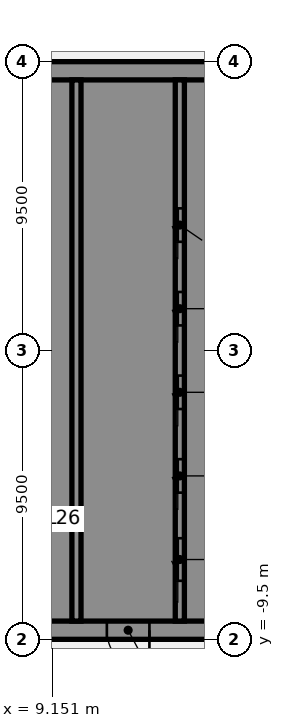
"""IFC4 building model, lengths in metres.
Left out: names, types, materials, properties, quantities, classifications, styles, units other than length and angle.
Written with IfcOpenShell. Run it as: python <this file> out.ifc"""

import sys

from ifc_helpers import new_model, si_unit, direction, frame, frame_2d, origin, place, context, subcontext, project, spatial, polyline, rectangle, outline, extrude, element, fill, save


model = new_model("IFC4")
c1 = context("Model", 3, precision=1e-05, world=origin(), true_north=direction((0.0, 1.0)))
c2 = subcontext(c1, "Body", "Model", "MODEL_VIEW")
j1 = project(units=[si_unit("LENGTHUNIT", "METRE"), si_unit("PLANEANGLEUNIT", "RADIAN")], contexts=[c1])
p1 = place(None, origin())
s1 = spatial("IfcSite", under=j1, at=p1, CompositionType="ELEMENT")
p2 = place(p1, origin())
s2 = spatial("IfcBuilding", under=s1, at=p2, CompositionType="ELEMENT")
p3 = place(p2, frame((0.0, 0.0, 109.75)))
s3 = spatial("IfcBuildingStorey", under=s2, at=p3, CompositionType="ELEMENT", Elevation=109.75)
p4 = place(p3, frame((16.5, -9.2, 0.0), z_axis=(0.0, 0.0, 1.0), x_axis=(-1.0, 0.0, 0.0)))
e1 = element("IfcWall", 1, at=p4, inside=s3, PredefinedType="SHEAR", context=c2, shape_type="SweptSolid", body=[
    extrude(rectangle(XDim=13.0, YDim=0.6, at=frame_2d((6.5, 0.0))), origin(), (0.0, 0.0, 1.0), 3.61),
])
p5 = place(p4, frame((4.15, 0.0, 0.0)))
e2 = element("IfcOpeningElement", 2, at=p5, cuts=e1, PredefinedType="OPENING", context=c2, shape_type="SweptSolid", body=[
    extrude(rectangle(XDim=1.4, YDim=2.1, at=frame_2d((0.7, 1.05))), frame((0.0, 0.31, 0.0), z_axis=(0.0, -1.0, 0.0), x_axis=(1.0, 0.0, 0.0)), (0.0, 0.0, 1.0), 0.62),
])
p6 = place(p4, frame((10.125, 0.0, 0.0)))
e3 = element("IfcOpeningElement", 3, at=p6, cuts=e1, PredefinedType="OPENING", context=c2, shape_type="SweptSolid", body=[
    extrude(rectangle(XDim=1.4, YDim=2.1, at=frame_2d((0.7, 1.05))), frame((0.0, 0.31, 0.0), z_axis=(0.0, -1.0, 0.0), x_axis=(1.0, 0.0, 0.0)), (0.0, 0.0, 1.0), 0.62),
])
p7 = place(p3, origin())
e4 = element("IfcWall", 4, at=p7, inside=s3, PredefinedType="SHEAR", context=c2, shape_type="SweptSolid", body=[
    extrude(outline(polyline([(13.5, -8.9), (15.9, -8.9), (16.5, -8.9), (16.5, 8.9), (15.9, 8.9), (13.5, 8.9), (13.5, 8.125), (15.9, 8.125), (15.9, 5.625), (13.5, 5.625), (13.5, 5.375), (15.9, 5.375), (15.9, 2.875), (13.5, 2.875), (13.5, 2.625), (15.9, 2.625), (15.9, 0.125), (13.5, 0.125), (13.5, -0.125), (15.9, -0.125), (15.9, -2.625), (13.5, -2.625), (13.5, -2.875), (15.9, -2.875), (15.9, -5.375), (13.5, -5.375), (13.5, -5.625), (15.9, -5.625), (15.9, -8.125), (13.5, -8.125), (13.5, -8.9)])), origin(), (0.0, 0.0, 1.0), 3.61),
])
p8 = place(p3, frame((16.5, 9.2, 0.0), z_axis=(0.0, 0.0, 1.0), x_axis=(-1.0, 0.0, 0.0)))
e5 = element("IfcWall", 5, at=p8, inside=s3, PredefinedType="SHEAR", context=c2, shape_type="SweptSolid", body=[
    extrude(rectangle(XDim=13.0, YDim=0.6, at=frame_2d((6.5, 0.0))), origin(), (0.0, 0.0, 1.0), 3.61),
])
p9 = place(p3, origin())
e6 = element("IfcWall", 6, at=p9, inside=s3, PredefinedType="SHEAR", context=c2, shape_type="SweptSolid", body=[
    extrude(outline(polyline([(9.8, -5.375), (7.5, -5.375), (7.5, -2.875), (9.8, -2.875), (9.8, -2.625), (7.5, -2.625), (7.5, -0.125), (9.8, -0.125), (9.8, 0.125), (7.5, 0.125), (7.5, 2.625), (9.8, 2.625), (9.8, 2.875), (7.5, 2.875), (7.5, 5.375), (9.8, 5.375), (9.8, 5.625), (7.5, 5.625), (7.5, 8.125), (9.8, 8.125), (9.8, 8.9), (7.5, 8.9), (7.2, 8.9), (7.2, -5.625), (7.5, -5.625), (9.8, -5.625), (9.8, -5.375)])), origin(), (0.0, 0.0, 1.0), 3.61),
])
p10 = place(p3, origin())
e7 = element("IfcWall", 7, at=p10, inside=s3, PredefinedType="SHEAR", context=c2, shape_type="SweptSolid", body=[
    extrude(outline(polyline([(7.5, -8.125), (7.5, -8.9), (9.8, -8.9), (9.8, -8.125), (9.8, -5.625), (9.55, -5.625), (9.55, -8.125), (7.5, -8.125)])), origin(), (0.0, 0.0, 1.0), 3.61),
])
p11 = place(p3, frame((13.35, -8.9, 0.0), z_axis=(0.0, 0.0, 1.0), x_axis=(0.0, 1.0, 0.0)))
e8 = element("IfcWall", 8, at=p11, inside=s3, PredefinedType="SHEAR", context=c2, shape_type="SweptSolid", body=[
    extrude(rectangle(XDim=17.8, YDim=0.3, at=frame_2d((8.9, 0.0))), origin(), (0.0, 0.0, 1.0), 3.61),
])
p12 = place(p11, frame((1.325, 0.0, 0.0)))
e9 = element("IfcOpeningElement", 9, at=p12, cuts=e8, PredefinedType="OPENING", context=c2, shape_type="SweptSolid", body=[
    extrude(rectangle(XDim=1.4, YDim=2.1, at=frame_2d((0.7, 1.05))), frame((0.0, 0.16, 0.0), z_axis=(0.0, -1.0, 0.0), x_axis=(1.0, 0.0, 0.0)), (0.0, 0.0, 1.0), 0.32),
])
p13 = place(p11, frame((4.225, 0.0, 0.0)))
e10 = element("IfcOpeningElement", 10, at=p13, cuts=e8, PredefinedType="OPENING", context=c2, shape_type="SweptSolid", body=[
    extrude(rectangle(XDim=1.1, YDim=2.1, at=frame_2d((0.55, 1.05))), frame((0.0, 0.16, 0.0), z_axis=(0.0, -1.0, 0.0), x_axis=(1.0, 0.0, 0.0)), (0.0, 0.0, 1.0), 0.32),
])
p14 = place(p11, frame((6.975, 0.0, 0.0)))
e11 = element("IfcOpeningElement", 11, at=p14, cuts=e8, PredefinedType="OPENING", context=c2, shape_type="SweptSolid", body=[
    extrude(rectangle(XDim=1.1, YDim=2.1, at=frame_2d((0.55, 1.05))), frame((0.0, 0.16, 0.0), z_axis=(0.0, -1.0, 0.0), x_axis=(1.0, 0.0, 0.0)), (0.0, 0.0, 1.0), 0.32),
])
p15 = place(p11, frame((9.725, 0.0, 0.0)))
e12 = element("IfcOpeningElement", 12, at=p15, cuts=e8, PredefinedType="OPENING", context=c2, shape_type="SweptSolid", body=[
    extrude(rectangle(XDim=1.1, YDim=2.1, at=frame_2d((0.55, 1.05))), frame((0.0, 0.16, 0.0), z_axis=(0.0, -1.0, 0.0), x_axis=(1.0, 0.0, 0.0)), (0.0, 0.0, 1.0), 0.32),
])
p16 = place(p11, frame((12.475, 0.0, 0.0)))
e13 = element("IfcOpeningElement", 13, at=p16, cuts=e8, PredefinedType="OPENING", context=c2, shape_type="SweptSolid", body=[
    extrude(rectangle(XDim=1.1, YDim=2.1, at=frame_2d((0.55, 1.05))), frame((0.0, 0.16, 0.0), z_axis=(0.0, -1.0, 0.0), x_axis=(1.0, 0.0, 0.0)), (0.0, 0.0, 1.0), 0.32),
])
p17 = place(p3, frame((9.95, -8.9, 0.0), z_axis=(0.0, 0.0, 1.0), x_axis=(0.0, 1.0, 0.0)))
e14 = element("IfcWall", 14, at=p17, inside=s3, PredefinedType="SHEAR", context=c2, shape_type="SweptSolid", body=[
    extrude(rectangle(XDim=17.8, YDim=0.3, at=frame_2d((8.9, 0.0))), origin(), (0.0, 0.0, 1.0), 3.61),
])
p18 = place(p5, origin())
e15 = element("IfcDoor", 15, at=p18, inside=s3, OperationType="SINGLE_SWING_LEFT", PredefinedType="DOOR", context=c2, shape_type="SweptSolid", body=[
    extrude(rectangle(XDim=1.4, YDim=2.1, at=frame_2d((0.7, 1.05))), frame((0.0, 0.025, 0.0), z_axis=(0.0, -1.0, 0.0), x_axis=(1.0, 0.0, 0.0)), (0.0, 0.0, 1.0), 0.05),
])
fill(e2, e15)
p19 = place(p12, origin())
e16 = element("IfcDoor", 16, at=p19, inside=s3, OperationType="SLIDING_TO_LEFT", PredefinedType="DOOR", context=c2, shape_type="SweptSolid", body=[
    extrude(rectangle(XDim=1.4, YDim=2.1, at=frame_2d((0.7, 1.05))), frame((0.0, 0.025, 0.0), z_axis=(0.0, -1.0, 0.0), x_axis=(1.0, 0.0, 0.0)), (0.0, 0.0, 1.0), 0.05),
])
fill(e9, e16)
p20 = place(p13, origin())
e17 = element("IfcDoor", 17, at=p20, inside=s3, OperationType="SLIDING_TO_LEFT", PredefinedType="DOOR", context=c2, shape_type="SweptSolid", body=[
    extrude(rectangle(XDim=1.1, YDim=2.1, at=frame_2d((0.55, 1.05))), frame((0.0, 0.025, 0.0), z_axis=(0.0, -1.0, 0.0), x_axis=(1.0, 0.0, 0.0)), (0.0, 0.0, 1.0), 0.05),
])
fill(e10, e17)
p21 = place(p14, origin())
e18 = element("IfcDoor", 18, at=p21, inside=s3, OperationType="SLIDING_TO_LEFT", PredefinedType="DOOR", context=c2, shape_type="SweptSolid", body=[
    extrude(rectangle(XDim=1.1, YDim=2.1, at=frame_2d((0.55, 1.05))), frame((0.0, 0.025, 0.0), z_axis=(0.0, -1.0, 0.0), x_axis=(1.0, 0.0, 0.0)), (0.0, 0.0, 1.0), 0.05),
])
fill(e11, e18)
p22 = place(p15, origin())
e19 = element("IfcDoor", 19, at=p22, inside=s3, OperationType="SLIDING_TO_LEFT", PredefinedType="DOOR", context=c2, shape_type="SweptSolid", body=[
    extrude(rectangle(XDim=1.1, YDim=2.1, at=frame_2d((0.55, 1.05))), frame((0.0, 0.025, 0.0), z_axis=(0.0, -1.0, 0.0), x_axis=(1.0, 0.0, 0.0)), (0.0, 0.0, 1.0), 0.05),
])
fill(e12, e19)
p23 = place(p16, origin())
e20 = element("IfcDoor", 20, at=p23, inside=s3, OperationType="SLIDING_TO_LEFT", PredefinedType="DOOR", context=c2, shape_type="SweptSolid", body=[
    extrude(rectangle(XDim=1.1, YDim=2.1, at=frame_2d((0.55, 1.05))), frame((0.0, 0.025, 0.0), z_axis=(0.0, -1.0, 0.0), x_axis=(1.0, 0.0, 0.0)), (0.0, 0.0, 1.0), 0.05),
])
fill(e13, e20)
save(model, sys.argv[1])
